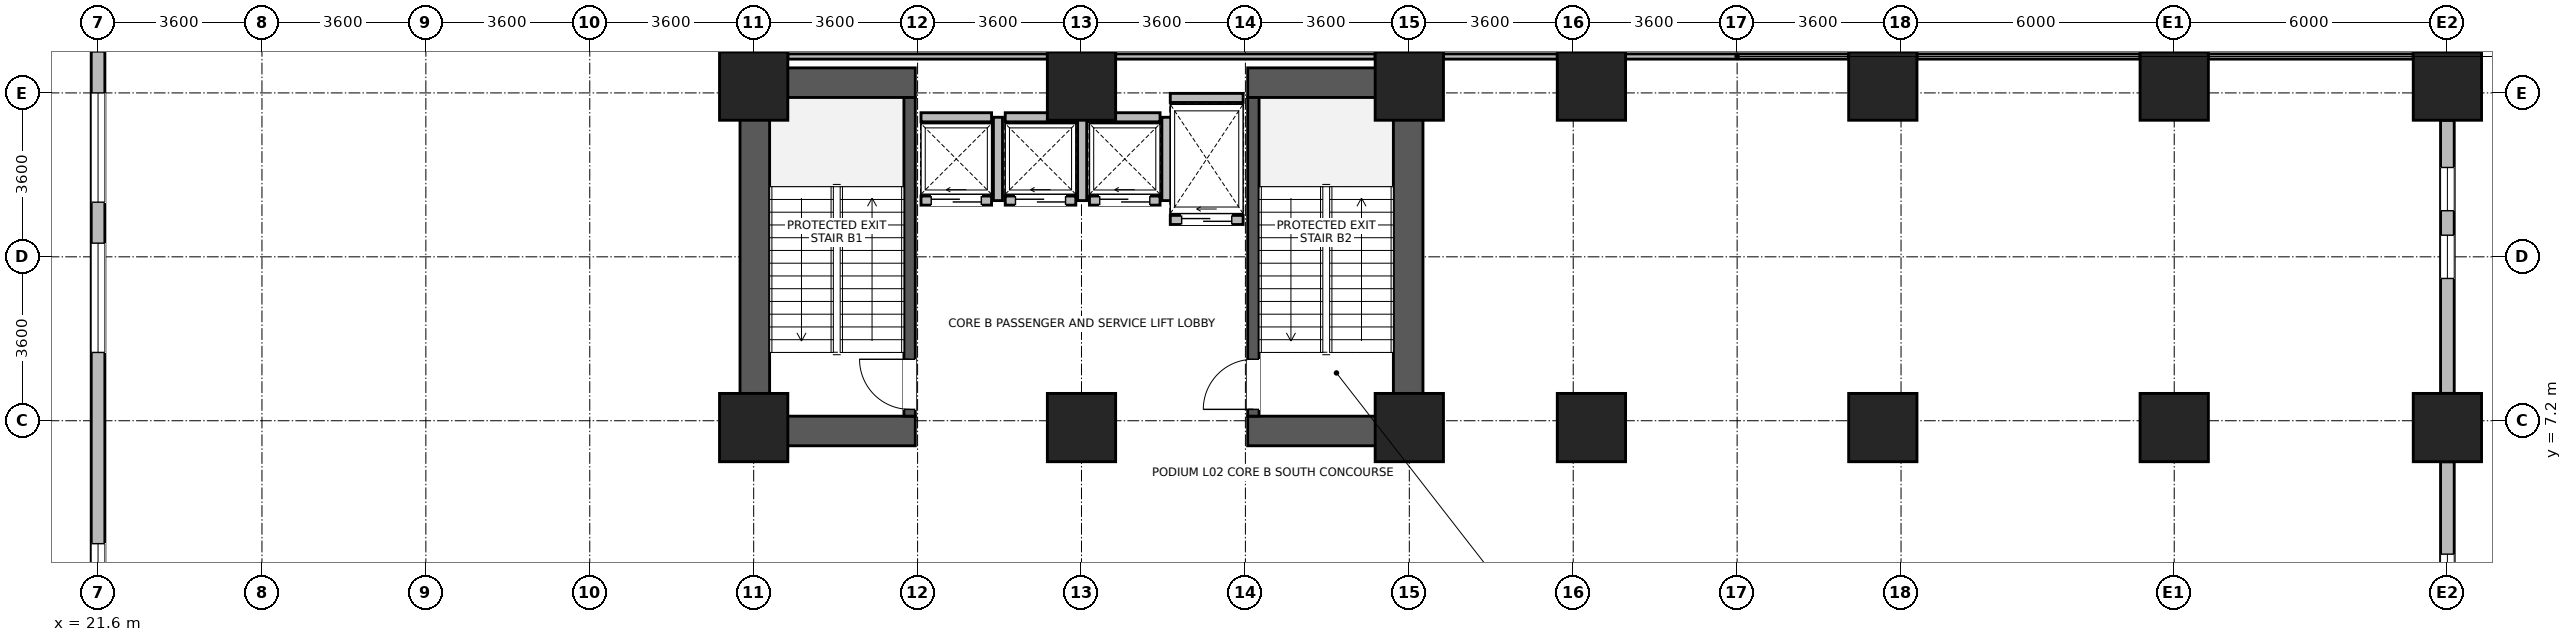
"""IFC4 building model, lengths in metres.
Left out: names, types, materials, properties, quantities, classifications, styles, units other than length and angle.
Written with IfcOpenShell. Run it as: python <this file> out.ifc"""

import sys

from ifc_helpers import new_model, si_unit, direction, frame, frame_2d, origin, origin_2d, place, context, subcontext, project, spatial, rectangle, extrude, source, transform, mapped, element, fill, save


model = new_model("IFC4")
c1 = context("Model", 3, precision=1e-05, world=origin(), true_north=direction((0.0, 1.0)))
c2 = subcontext(c1, "Body", "Model", "MODEL_VIEW")
j1 = project(units=[si_unit("LENGTHUNIT", "METRE"), si_unit("PLANEANGLEUNIT", "RADIAN")], contexts=[c1])
p1 = place(None, origin())
s1 = spatial("IfcSite", under=j1, at=p1, CompositionType="ELEMENT")
p2 = place(p1, origin())
s2 = spatial("IfcBuilding", under=s1, at=p2, CompositionType="ELEMENT")
p3 = place(p2, frame((0.0, 0.0, 10.2)))
s3 = spatial("IfcBuildingStorey", under=s2, at=p3, CompositionType="ELEMENT", Elevation=10.2)
for number, where, z_axis, x_axis in (
    (1, (36.025, 6.65, 0.0), (0.0, 0.0, 1.0), (0.0, 1.0, 0.0)),
    (2, (50.375, 6.65, 0.0), (0.0, 0.0, 1.0), (0.0, 1.0, 0.0)),
):
    element("IfcWall", number, at=place(p3, frame(where, z_axis=z_axis, x_axis=x_axis)), inside=s3, PredefinedType="SHEAR", context=c2, shape_type="SweptSolid", body=[
        extrude(rectangle(XDim=8.3, YDim=0.65, at=frame_2d((4.15, 0.0))), origin(), (0.0, 0.0, 1.0), 4.52),
    ])
for number, where, z_axis, x_axis in (
    (3, (36.35, 6.975, 0.0), (0.0, 0.0, 1.0), (1.0, 0.0, 0.0)),
    (4, (46.85, 6.975, 0.0), (0.0, 0.0, 1.0), (1.0, 0.0, 0.0)),
    (5, (36.35, 14.625, 0.0), (0.0, 0.0, 1.0), (1.0, 0.0, 0.0)),
    (6, (46.85, 14.625, 0.0), (0.0, 0.0, 1.0), (1.0, 0.0, 0.0)),
):
    element("IfcWall", number, at=place(p3, frame(where, z_axis=z_axis, x_axis=x_axis)), inside=s3, PredefinedType="SHEAR", context=c2, shape_type="SweptSolid", body=[
        extrude(rectangle(XDim=3.2, YDim=0.65, at=frame_2d((1.6, 0.0))), origin(), (0.0, 0.0, 1.0), 4.52),
    ])
p4 = place(p3, frame((39.425, 7.3, 0.0), z_axis=(0.0, 0.0, 1.0), x_axis=(0.0, 1.0, 0.0)))
e7 = element("IfcWall", 7, at=p4, inside=s3, PredefinedType="SHEAR", context=c2, shape_type="SweptSolid", body=[
    extrude(rectangle(XDim=7.0, YDim=0.25, at=frame_2d((3.5, 0.0))), origin(), (0.0, 0.0, 1.0), 4.52),
])
p5 = place(p4, frame((0.15, 0.0, 0.0)))
e8 = element("IfcOpeningElement", 8, at=p5, cuts=e7, PredefinedType="OPENING", context=c2, shape_type="SweptSolid", body=[
    extrude(rectangle(XDim=1.1, YDim=2.08, at=frame_2d((0.55, 1.04))), frame((0.0, 0.135, 0.0), z_axis=(0.0, -1.0, 0.0), x_axis=(1.0, 0.0, 0.0)), (0.0, 0.0, 1.0), 0.27),
])
p6 = place(p3, frame((46.975, 7.3, 0.0), z_axis=(0.0, 0.0, 1.0), x_axis=(0.0, 1.0, 0.0)))
e9 = element("IfcWall", 9, at=p6, inside=s3, PredefinedType="SHEAR", context=c2, shape_type="SweptSolid", body=[
    extrude(rectangle(XDim=7.0, YDim=0.25, at=frame_2d((3.5, 0.0))), origin(), (0.0, 0.0, 1.0), 4.52),
])
p7 = place(p6, frame((0.15, 0.0, 0.0)))
e10 = element("IfcOpeningElement", 10, at=p7, cuts=e9, PredefinedType="OPENING", context=c2, shape_type="SweptSolid", body=[
    extrude(rectangle(XDim=1.1, YDim=2.08, at=frame_2d((0.55, 1.04))), frame((0.0, 0.135, 0.0), z_axis=(0.0, -1.0, 0.0), x_axis=(1.0, 0.0, 0.0)), (0.0, 0.0, 1.0), 0.27),
])
m1 = source(origin(), c2, "Body", "SweptSolid", [
    extrude(rectangle(XDim=1.5, YDim=1.5, at=origin_2d()), origin(), (0.0, 0.0, 1.0), 4.8),
])
for number, where, z_axis, x_axis in (
    (11, (36.0, 7.05, 0.0), (0.0, 0.0, 1.0), (1.0, 0.0, 0.0)),
    (12, (36.0, 14.55, 0.0), (0.0, 0.0, 1.0), (1.0, 0.0, 0.0)),
    (13, (43.2, 7.05, 0.0), (0.0, 0.0, 1.0), (1.0, 0.0, 0.0)),
    (14, (43.2, 14.55, 0.0), (0.0, 0.0, 1.0), (1.0, 0.0, 0.0)),
    (15, (50.4, 7.05, 0.0), (0.0, 0.0, 1.0), (1.0, 0.0, 0.0)),
    (16, (50.4, 14.55, 0.0), (0.0, 0.0, 1.0), (1.0, 0.0, 0.0)),
    (17, (54.4, 7.05, 0.0), (0.0, 0.0, 1.0), (1.0, 0.0, 0.0)),
    (18, (54.4, 14.55, 0.0), (0.0, 0.0, 1.0), (1.0, 0.0, 0.0)),
    (19, (60.8, 14.55, 0.0), (0.0, 0.0, 1.0), (1.0, 0.0, 0.0)),
    (20, (60.8, 7.05, 0.0), (0.0, 0.0, 1.0), (1.0, 0.0, 0.0)),
    (21, (67.2, 7.05, 0.0), (0.0, 0.0, 1.0), (1.0, 0.0, 0.0)),
    (22, (67.2, 14.55, 0.0), (0.0, 0.0, 1.0), (1.0, 0.0, 0.0)),
    (23, (73.2, 7.05, 0.0), (0.0, 0.0, 1.0), (1.0, 0.0, 0.0)),
    (24, (73.2, 14.55, 0.0), (0.0, 0.0, 1.0), (1.0, 0.0, 0.0)),
):
    element("IfcColumn", number, at=place(p3, frame(where, z_axis=z_axis, x_axis=x_axis)), inside=s3, PredefinedType="COLUMN", context=c2, shape_type="MappedRepresentation", body=[
        mapped(m1, transform((0.0, 0.0, 0.0), x_axis=(1.0, 0.0, 0.0), y_axis=(0.0, 1.0, 0.0), z_axis=(0.0, 0.0, 1.0), scale=1.0)),
    ])
p8 = place(p3, frame((73.2, 6.299, 0.0), z_axis=(0.0, 0.0, 1.0), x_axis=(0.0, -1.0, 0.0)))
e25 = element("IfcWall", 25, at=p8, inside=s3, PredefinedType="STANDARD", context=c2, shape_type="SweptSolid", body=[
    extrude(rectangle(XDim=3.348, YDim=0.3, at=frame_2d((1.674, 0.0))), origin(), (0.0, 0.0, 1.0), 3.9),
])
p9 = place(p8, frame((2.029, 0.0, 0.9)))
e26 = element("IfcOpeningElement", 26, at=p9, cuts=e25, PredefinedType="OPENING", context=c2, shape_type="SweptSolid", body=[
    extrude(rectangle(XDim=0.95, YDim=1.75, at=frame_2d((0.475, 0.875))), frame((0.0, 0.16, 0.0), z_axis=(0.0, -1.0, 0.0), x_axis=(1.0, 0.0, 0.0)), (0.0, 0.0, 1.0), 0.32),
])
p10 = place(p3, frame((73.2, 13.799, 0.0), z_axis=(0.0, 0.0, 1.0), x_axis=(0.0, -1.0, 0.0)))
e27 = element("IfcWall", 27, at=p10, inside=s3, PredefinedType="STANDARD", context=c2, shape_type="SweptSolid", body=[
    extrude(rectangle(XDim=5.998, YDim=0.3, at=frame_2d((2.999, 0.0))), origin(), (0.0, 0.0, 1.0), 3.9),
])
p11 = place(p10, frame((2.524, 0.0, 0.9)))
e28 = element("IfcOpeningElement", 28, at=p11, cuts=e27, PredefinedType="OPENING", context=c2, shape_type="SweptSolid", body=[
    extrude(rectangle(XDim=0.95, YDim=1.75, at=frame_2d((0.475, 0.875))), frame((0.0, 0.16, 0.0), z_axis=(0.0, -1.0, 0.0), x_axis=(1.0, 0.0, 0.0)), (0.0, 0.0, 1.0), 0.32),
])
p12 = place(p10, frame((1.037, 0.0, 0.9)))
e29 = element("IfcOpeningElement", 29, at=p12, cuts=e27, PredefinedType="OPENING", context=c2, shape_type="SweptSolid", body=[
    extrude(rectangle(XDim=0.95, YDim=1.75, at=frame_2d((0.475, 0.875))), frame((0.0, 0.16, 0.0), z_axis=(0.0, -1.0, 0.0), x_axis=(1.0, 0.0, 0.0)), (0.0, 0.0, 1.0), 0.32),
])
p13 = place(p3, frame((21.6, 1.65, 0.0), z_axis=(0.0, 0.0, 1.0), x_axis=(0.0, 1.0, 0.0)))
e30 = element("IfcWall", 30, at=p13, inside=s3, PredefinedType="STANDARD", context=c2, shape_type="SweptSolid", body=[
    extrude(rectangle(XDim=16.5, YDim=0.3, at=frame_2d((8.25, 0.0))), origin(), (0.0, 0.0, 1.0), 4.5),
])
p14 = place(p13, frame((0.45, 0.0, 0.9)))
e31 = element("IfcOpeningElement", 31, at=p14, cuts=e30, PredefinedType="OPENING", context=c2, shape_type="SweptSolid", body=[
    extrude(rectangle(XDim=2.4, YDim=2.5, at=frame_2d((1.2, 1.25))), frame((0.0, 0.16, 0.0), z_axis=(0.0, -1.0, 0.0), x_axis=(1.0, 0.0, 0.0)), (0.0, 0.0, 1.0), 0.32),
])
p15 = place(p13, frame((7.05, 0.0, 0.9)))
e32 = element("IfcOpeningElement", 32, at=p15, cuts=e30, PredefinedType="OPENING", context=c2, shape_type="SweptSolid", body=[
    extrude(rectangle(XDim=2.4, YDim=2.5, at=frame_2d((1.2, 1.25))), frame((0.0, 0.16, 0.0), z_axis=(0.0, -1.0, 0.0), x_axis=(1.0, 0.0, 0.0)), (0.0, 0.0, 1.0), 0.32),
])
p16 = place(p13, frame((10.35, 0.0, 0.9)))
e33 = element("IfcOpeningElement", 33, at=p16, cuts=e30, PredefinedType="OPENING", context=c2, shape_type="SweptSolid", body=[
    extrude(rectangle(XDim=2.4, YDim=2.5, at=frame_2d((1.2, 1.25))), frame((0.0, 0.16, 0.0), z_axis=(0.0, -1.0, 0.0), x_axis=(1.0, 0.0, 0.0)), (0.0, 0.0, 1.0), 0.32),
])
p17 = place(p13, frame((13.65, 0.0, 0.9)))
e34 = element("IfcOpeningElement", 34, at=p17, cuts=e30, PredefinedType="OPENING", context=c2, shape_type="SweptSolid", body=[
    extrude(rectangle(XDim=2.4, YDim=2.5, at=frame_2d((1.2, 1.25))), frame((0.0, 0.16, 0.0), z_axis=(0.0, -1.0, 0.0), x_axis=(1.0, 0.0, 0.0)), (0.0, 0.0, 1.0), 0.32),
])
p18 = place(p3, frame((39.675, 12.035, 0.0), z_axis=(0.0, 0.0, 1.0), x_axis=(1.0, 0.0, 0.0)))
e35 = element("IfcWall", 35, at=p18, inside=s3, PredefinedType="PARTITIONING", context=c2, shape_type="SweptSolid", body=[
    extrude(rectangle(XDim=1.55, YDim=0.2, at=frame_2d((0.775, 0.0))), origin(), (0.0, 0.0, 1.0), 4.5),
])
p19 = place(p18, frame((0.225, 0.0, 0.0)))
e36 = element("IfcOpeningElement", 36, at=p19, cuts=e35, PredefinedType="OPENING", context=c2, shape_type="SweptSolid", body=[
    extrude(rectangle(XDim=1.1, YDim=2.12, at=frame_2d((0.55, 1.06))), frame((0.0, 0.11, 0.0), z_axis=(0.0, -1.0, 0.0), x_axis=(1.0, 0.0, 0.0)), (0.0, 0.0, 1.0), 0.22),
])
p20 = place(p3, frame((39.675, 13.865, 0.0), z_axis=(0.0, 0.0, 1.0), x_axis=(1.0, 0.0, 0.0)))
e37 = element("IfcWall", 37, at=p20, inside=s3, PredefinedType="PARTITIONING", context=c2, shape_type="SweptSolid", body=[
    extrude(rectangle(XDim=1.55, YDim=0.2, at=frame_2d((0.775, 0.0))), origin(), (0.0, 0.0, 1.0), 4.5),
])
p21 = place(p3, frame((41.365, 12.035, 0.0), z_axis=(0.0, 0.0, 1.0), x_axis=(0.0, 1.0, 0.0)))
e38 = element("IfcWall", 38, at=p21, inside=s3, PredefinedType="PARTITIONING", context=c2, shape_type="SweptSolid", body=[
    extrude(rectangle(XDim=1.83, YDim=0.2, at=frame_2d((0.915, 0.0))), origin(), (0.0, 0.0, 1.0), 4.5),
])
p22 = place(p3, frame((41.525, 12.035, 0.0), z_axis=(0.0, 0.0, 1.0), x_axis=(1.0, 0.0, 0.0)))
e39 = element("IfcWall", 39, at=p22, inside=s3, PredefinedType="PARTITIONING", context=c2, shape_type="SweptSolid", body=[
    extrude(rectangle(XDim=1.55, YDim=0.2, at=frame_2d((0.775, 0.0))), origin(), (0.0, 0.0, 1.0), 4.5),
])
p23 = place(p22, frame((0.225, 0.0, 0.0)))
e40 = element("IfcOpeningElement", 40, at=p23, cuts=e39, PredefinedType="OPENING", context=c2, shape_type="SweptSolid", body=[
    extrude(rectangle(XDim=1.1, YDim=2.12, at=frame_2d((0.55, 1.06))), frame((0.0, 0.11, 0.0), z_axis=(0.0, -1.0, 0.0), x_axis=(1.0, 0.0, 0.0)), (0.0, 0.0, 1.0), 0.22),
])
p24 = place(p3, frame((41.525, 13.865, 0.0), z_axis=(0.0, 0.0, 1.0), x_axis=(1.0, 0.0, 0.0)))
e41 = element("IfcWall", 41, at=p24, inside=s3, PredefinedType="PARTITIONING", context=c2, shape_type="SweptSolid", body=[
    extrude(rectangle(XDim=1.55, YDim=0.2, at=frame_2d((0.775, 0.0))), origin(), (0.0, 0.0, 1.0), 4.5),
])
p25 = place(p3, frame((43.215, 12.035, 0.0), z_axis=(0.0, 0.0, 1.0), x_axis=(0.0, 1.0, 0.0)))
e42 = element("IfcWall", 42, at=p25, inside=s3, PredefinedType="PARTITIONING", context=c2, shape_type="SweptSolid", body=[
    extrude(rectangle(XDim=1.83, YDim=0.2, at=frame_2d((0.915, 0.0))), origin(), (0.0, 0.0, 1.0), 4.5),
])
p26 = place(p3, frame((43.375, 12.035, 0.0), z_axis=(0.0, 0.0, 1.0), x_axis=(1.0, 0.0, 0.0)))
e43 = element("IfcWall", 43, at=p26, inside=s3, PredefinedType="PARTITIONING", context=c2, shape_type="SweptSolid", body=[
    extrude(rectangle(XDim=1.55, YDim=0.2, at=frame_2d((0.775, 0.0))), origin(), (0.0, 0.0, 1.0), 4.5),
])
p27 = place(p26, frame((0.225, 0.0, 0.0)))
e44 = element("IfcOpeningElement", 44, at=p27, cuts=e43, PredefinedType="OPENING", context=c2, shape_type="SweptSolid", body=[
    extrude(rectangle(XDim=1.1, YDim=2.12, at=frame_2d((0.55, 1.06))), frame((0.0, 0.11, 0.0), z_axis=(0.0, -1.0, 0.0), x_axis=(1.0, 0.0, 0.0)), (0.0, 0.0, 1.0), 0.22),
])
p28 = place(p3, frame((43.375, 13.865, 0.0), z_axis=(0.0, 0.0, 1.0), x_axis=(1.0, 0.0, 0.0)))
e45 = element("IfcWall", 45, at=p28, inside=s3, PredefinedType="PARTITIONING", context=c2, shape_type="SweptSolid", body=[
    extrude(rectangle(XDim=1.55, YDim=0.2, at=frame_2d((0.775, 0.0))), origin(), (0.0, 0.0, 1.0), 4.5),
])
p29 = place(p3, frame((45.065, 12.035, 0.0), z_axis=(0.0, 0.0, 1.0), x_axis=(0.0, 1.0, 0.0)))
e46 = element("IfcWall", 46, at=p29, inside=s3, PredefinedType="PARTITIONING", context=c2, shape_type="SweptSolid", body=[
    extrude(rectangle(XDim=1.83, YDim=0.2, at=frame_2d((0.915, 0.0))), origin(), (0.0, 0.0, 1.0), 4.5),
])
p30 = place(p3, frame((45.15, 11.61, 0.0), z_axis=(0.0, 0.0, 1.0), x_axis=(1.0, 0.0, 0.0)))
e47 = element("IfcWall", 47, at=p30, inside=s3, PredefinedType="PARTITIONING", context=c2, shape_type="SweptSolid", body=[
    extrude(rectangle(XDim=1.6, YDim=0.2, at=frame_2d((0.8, 0.0))), origin(), (0.0, 0.0, 1.0), 4.5),
])
p31 = place(p30, frame((0.25, 0.0, 0.0)))
e48 = element("IfcOpeningElement", 48, at=p31, cuts=e47, PredefinedType="OPENING", context=c2, shape_type="SweptSolid", body=[
    extrude(rectangle(XDim=1.1, YDim=2.12, at=frame_2d((0.55, 1.06))), frame((0.0, 0.11, 0.0), z_axis=(0.0, -1.0, 0.0), x_axis=(1.0, 0.0, 0.0)), (0.0, 0.0, 1.0), 0.22),
])
p32 = place(p3, frame((45.15, 14.29, 0.0), z_axis=(0.0, 0.0, 1.0), x_axis=(1.0, 0.0, 0.0)))
e49 = element("IfcWall", 49, at=p32, inside=s3, PredefinedType="PARTITIONING", context=c2, shape_type="SweptSolid", body=[
    extrude(rectangle(XDim=1.6, YDim=0.2, at=frame_2d((0.8, 0.0))), origin(), (0.0, 0.0, 1.0), 3.3),
])
p33 = place(p3, frame((35.4, 15.3, 0.0), z_axis=(0.0, 0.0, 1.0), x_axis=(0.0, 1.0, 0.0)))
e50 = element("IfcWall", 50, at=p33, inside=s3, PredefinedType="PARTITIONING", context=c2, shape_type="SweptSolid", body=[
    extrude(rectangle(XDim=5.55, YDim=0.15, at=frame_2d((2.775, 0.0))), origin(), (0.0, 0.0, 1.0), 4.5),
])
for number, where, z_axis, x_axis in (
    (51, (36.75, 15.2, 0.0), (0.0, 0.0, 1.0), (1.0, 0.0, 0.0)),
    (52, (43.95, 15.2, 0.0), (0.0, 0.0, 1.0), (1.0, 0.0, 0.0)),
):
    element("IfcWall", number, at=place(p3, frame(where, z_axis=z_axis, x_axis=x_axis)), inside=s3, PredefinedType="PARTITIONING", context=c2, shape_type="SweptSolid", body=[
        extrude(rectangle(XDim=5.7, YDim=0.115, at=frame_2d((2.85, 0.0))), origin(), (0.0, 0.0, 1.0), 4.5),
    ])
p34 = place(p3, frame((51.15, 15.2, 0.0), z_axis=(0.0, 0.0, 1.0), x_axis=(1.0, 0.0, 0.0)))
e53 = element("IfcWall", 53, at=p34, inside=s3, PredefinedType="PARTITIONING", context=c2, shape_type="SweptSolid", body=[
    extrude(rectangle(XDim=2.5, YDim=0.115, at=frame_2d((1.25, 0.0))), origin(), (0.0, 0.0, 1.0), 4.5),
])
p35 = place(p3, frame((55.15, 15.2, 0.0), z_axis=(0.0, 0.0, 1.0), x_axis=(1.0, 0.0, 0.0)))
e54 = element("IfcWall", 54, at=p35, inside=s3, PredefinedType="PARTITIONING", context=c2, shape_type="SweptSolid", body=[
    extrude(rectangle(XDim=4.9, YDim=0.115, at=frame_2d((2.45, 0.0))), origin(), (0.0, 0.0, 1.0), 4.5),
])
p36 = place(p3, frame((61.55, 15.2, 0.0), z_axis=(0.0, 0.0, 1.0), x_axis=(1.0, 0.0, 0.0)))
e55 = element("IfcWall", 55, at=p36, inside=s3, PredefinedType="PARTITIONING", context=c2, shape_type="SweptSolid", body=[
    extrude(rectangle(XDim=4.9, YDim=0.115, at=frame_2d((2.45, 0.0))), origin(), (0.0, 0.0, 1.0), 4.5),
])
p37 = place(p3, frame((67.95, 15.2, 0.0), z_axis=(0.0, 0.0, 1.0), x_axis=(1.0, 0.0, 0.0)))
e56 = element("IfcWall", 56, at=p37, inside=s3, PredefinedType="PARTITIONING", context=c2, shape_type="SweptSolid", body=[
    extrude(rectangle(XDim=4.5, YDim=0.115, at=frame_2d((2.25, 0.0))), origin(), (0.0, 0.0, 1.0), 4.5),
])
p38 = place(p9, origin())
e57 = element("IfcWindow", 57, at=p38, inside=s3, PartitioningType="SINGLE_PANEL", PredefinedType="WINDOW", context=c2, shape_type="SweptSolid", body=[
    extrude(rectangle(XDim=0.95, YDim=1.75, at=frame_2d((0.475, 0.875))), frame((0.0, 0.03, 0.0), z_axis=(0.0, -1.0, 0.0), x_axis=(1.0, 0.0, 0.0)), (0.0, 0.0, 1.0), 0.06),
])
fill(e26, e57)
p39 = place(p11, origin())
e58 = element("IfcWindow", 58, at=p39, inside=s3, PartitioningType="SINGLE_PANEL", PredefinedType="WINDOW", context=c2, shape_type="SweptSolid", body=[
    extrude(rectangle(XDim=0.95, YDim=1.75, at=frame_2d((0.475, 0.875))), frame((0.0, 0.03, 0.0), z_axis=(0.0, -1.0, 0.0), x_axis=(1.0, 0.0, 0.0)), (0.0, 0.0, 1.0), 0.06),
])
fill(e28, e58)
p40 = place(p12, origin())
e59 = element("IfcWindow", 59, at=p40, inside=s3, PartitioningType="SINGLE_PANEL", PredefinedType="WINDOW", context=c2, shape_type="SweptSolid", body=[
    extrude(rectangle(XDim=0.95, YDim=1.75, at=frame_2d((0.475, 0.875))), frame((0.0, 0.03, 0.0), z_axis=(0.0, -1.0, 0.0), x_axis=(1.0, 0.0, 0.0)), (0.0, 0.0, 1.0), 0.06),
])
fill(e29, e59)
p41 = place(p14, origin())
e60 = element("IfcWindow", 60, at=p41, inside=s3, PartitioningType="SINGLE_PANEL", PredefinedType="WINDOW", context=c2, shape_type="SweptSolid", body=[
    extrude(rectangle(XDim=2.4, YDim=2.5, at=frame_2d((1.2, 1.25))), frame((0.0, 0.03, 0.0), z_axis=(0.0, -1.0, 0.0), x_axis=(1.0, 0.0, 0.0)), (0.0, 0.0, 1.0), 0.06),
])
fill(e31, e60)
p42 = place(p15, origin())
e61 = element("IfcWindow", 61, at=p42, inside=s3, PartitioningType="SINGLE_PANEL", PredefinedType="WINDOW", context=c2, shape_type="SweptSolid", body=[
    extrude(rectangle(XDim=2.4, YDim=2.5, at=frame_2d((1.2, 1.25))), frame((0.0, 0.03, 0.0), z_axis=(0.0, -1.0, 0.0), x_axis=(1.0, 0.0, 0.0)), (0.0, 0.0, 1.0), 0.06),
])
fill(e32, e61)
p43 = place(p16, origin())
e62 = element("IfcWindow", 62, at=p43, inside=s3, PartitioningType="SINGLE_PANEL", PredefinedType="WINDOW", context=c2, shape_type="SweptSolid", body=[
    extrude(rectangle(XDim=2.4, YDim=2.5, at=frame_2d((1.2, 1.25))), frame((0.0, 0.03, 0.0), z_axis=(0.0, -1.0, 0.0), x_axis=(1.0, 0.0, 0.0)), (0.0, 0.0, 1.0), 0.06),
])
fill(e33, e62)
p44 = place(p17, origin())
e63 = element("IfcWindow", 63, at=p44, inside=s3, PartitioningType="SINGLE_PANEL", PredefinedType="WINDOW", context=c2, shape_type="SweptSolid", body=[
    extrude(rectangle(XDim=2.4, YDim=2.5, at=frame_2d((1.2, 1.25))), frame((0.0, 0.03, 0.0), z_axis=(0.0, -1.0, 0.0), x_axis=(1.0, 0.0, 0.0)), (0.0, 0.0, 1.0), 0.06),
])
fill(e34, e63)
p45 = place(p5, origin())
e64 = element("IfcDoor", 64, at=p45, inside=s3, OperationType="SINGLE_SWING_RIGHT", PredefinedType="DOOR", context=c2, shape_type="SweptSolid", body=[
    extrude(rectangle(XDim=1.1, YDim=2.08, at=frame_2d((0.55, 1.04))), frame((0.0, 0.025, 0.0), z_axis=(0.0, -1.0, 0.0), x_axis=(1.0, 0.0, 0.0)), (0.0, 0.0, 1.0), 0.05),
])
fill(e8, e64)
p46 = place(p7, origin())
e65 = element("IfcDoor", 65, at=p46, inside=s3, OperationType="SINGLE_SWING_LEFT", PredefinedType="DOOR", context=c2, shape_type="SweptSolid", body=[
    extrude(rectangle(XDim=1.1, YDim=2.08, at=frame_2d((0.55, 1.04))), frame((0.0, 0.025, 0.0), z_axis=(0.0, -1.0, 0.0), x_axis=(1.0, 0.0, 0.0)), (0.0, 0.0, 1.0), 0.05),
])
fill(e10, e65)
p47 = place(p19, origin())
e66 = element("IfcDoor", 66, at=p47, inside=s3, OperationType="SLIDING_TO_LEFT", PredefinedType="DOOR", context=c2, shape_type="SweptSolid", body=[
    extrude(rectangle(XDim=1.1, YDim=2.12, at=frame_2d((0.55, 1.06))), frame((0.0, 0.025, 0.0), z_axis=(0.0, -1.0, 0.0), x_axis=(1.0, 0.0, 0.0)), (0.0, 0.0, 1.0), 0.05),
])
fill(e36, e66)
p48 = place(p23, origin())
e67 = element("IfcDoor", 67, at=p48, inside=s3, OperationType="SLIDING_TO_LEFT", PredefinedType="DOOR", context=c2, shape_type="SweptSolid", body=[
    extrude(rectangle(XDim=1.1, YDim=2.12, at=frame_2d((0.55, 1.06))), frame((0.0, 0.025, 0.0), z_axis=(0.0, -1.0, 0.0), x_axis=(1.0, 0.0, 0.0)), (0.0, 0.0, 1.0), 0.05),
])
fill(e40, e67)
p49 = place(p27, origin())
e68 = element("IfcDoor", 68, at=p49, inside=s3, OperationType="SLIDING_TO_LEFT", PredefinedType="DOOR", context=c2, shape_type="SweptSolid", body=[
    extrude(rectangle(XDim=1.1, YDim=2.12, at=frame_2d((0.55, 1.06))), frame((0.0, 0.025, 0.0), z_axis=(0.0, -1.0, 0.0), x_axis=(1.0, 0.0, 0.0)), (0.0, 0.0, 1.0), 0.05),
])
fill(e44, e68)
p50 = place(p31, origin())
e69 = element("IfcDoor", 69, at=p50, inside=s3, OperationType="SLIDING_TO_LEFT", PredefinedType="DOOR", context=c2, shape_type="SweptSolid", body=[
    extrude(rectangle(XDim=1.1, YDim=2.12, at=frame_2d((0.55, 1.06))), frame((0.0, 0.025, 0.0), z_axis=(0.0, -1.0, 0.0), x_axis=(1.0, 0.0, 0.0)), (0.0, 0.0, 1.0), 0.05),
])
fill(e48, e69)
save(model, sys.argv[1])
